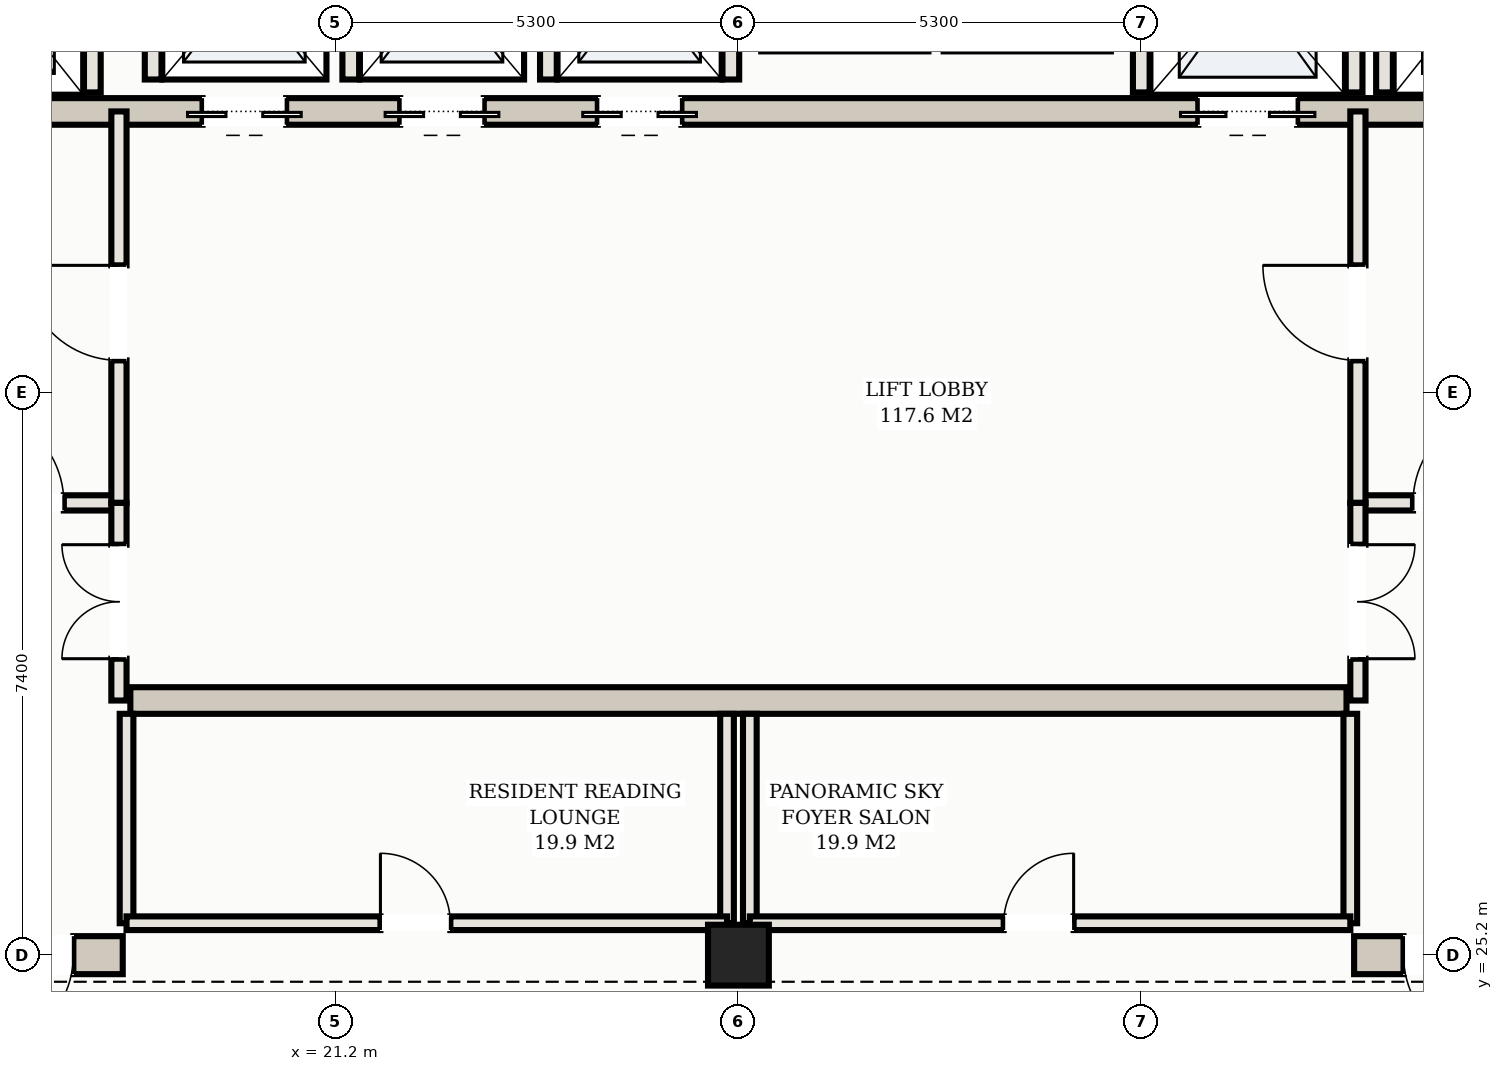
"""IFC4 building model, lengths in metres.
Left out: names, types, materials, properties, quantities, classifications, styles, units other than length and angle.
Written with IfcOpenShell. Run it as: python <this file> out.ifc"""

import sys

from ifc_helpers import new_model, si_unit, direction, frame, frame_2d, origin, origin_2d, place, context, subcontext, project, spatial, rectangle, hollow_rectangle, extrude, element, fill, save


model = new_model("IFC4")
c1 = context("Model", 3, precision=1e-05, world=origin(), true_north=direction((0.0, 1.0)))
c2 = subcontext(c1, "Body", "Model", "MODEL_VIEW")
j1 = project(units=[si_unit("LENGTHUNIT", "METRE"), si_unit("PLANEANGLEUNIT", "RADIAN")], contexts=[c1])
p1 = place(None, origin())
s1 = spatial("IfcSite", under=j1, at=p1, CompositionType="ELEMENT")
p2 = place(p1, origin())
s2 = spatial("IfcBuilding", under=s1, at=p2, CompositionType="ELEMENT")
p3 = place(p2, frame((0.0, 0.0, 203.3)))
s3 = spatial("IfcBuildingStorey", under=s2, at=p3, CompositionType="ELEMENT", Elevation=203.3)
p4 = place(p3, frame((10.35, 25.2, 0.0), z_axis=(0.0, 0.0, 1.0), x_axis=(1.0, 0.0, 0.0)))
e1 = element("IfcWall", 1, at=p4, inside=s3, PredefinedType="SHEAR", context=c2, shape_type="SweptSolid", body=[
    extrude(rectangle(XDim=8.05, YDim=0.5, at=frame_2d((4.025, 0.0))), origin(), (0.0, 0.0, 1.0), 3.11),
])
p5 = place(p4, frame((6.15, 0.0, 0.0)))
e2 = element("IfcOpeningElement", 2, at=p5, cuts=e1, PredefinedType="OPENING", context=c2, shape_type="SweptSolid", body=[
    extrude(rectangle(XDim=1.25, YDim=2.2, at=frame_2d((0.625, 1.1))), frame((0.0, 0.26, 0.0), z_axis=(0.0, -1.0, 0.0), x_axis=(1.0, 0.0, 0.0)), (0.0, 0.0, 1.0), 0.52),
])
p6 = place(p3, frame((34.6, 25.2, 0.0), z_axis=(0.0, 0.0, 1.0), x_axis=(1.0, 0.0, 0.0)))
e3 = element("IfcWall", 3, at=p6, inside=s3, PredefinedType="SHEAR", context=c2, shape_type="SweptSolid", body=[
    extrude(rectangle(XDim=8.05, YDim=0.5, at=frame_2d((4.025, 0.0))), origin(), (0.0, 0.0, 1.0), 3.11),
])
p7 = place(p6, frame((0.65, 0.0, 0.0)))
e4 = element("IfcOpeningElement", 4, at=p7, cuts=e3, PredefinedType="OPENING", context=c2, shape_type="SweptSolid", body=[
    extrude(rectangle(XDim=1.25, YDim=2.2, at=frame_2d((0.625, 1.1))), frame((0.0, 0.26, 0.0), z_axis=(0.0, -1.0, 0.0), x_axis=(1.0, 0.0, 0.0)), (0.0, 0.0, 1.0), 0.52),
])
p8 = place(p3, frame((15.5, 36.3, 0.0), z_axis=(0.0, 0.0, 1.0), x_axis=(1.0, 0.0, 0.0)))
e5 = element("IfcWall", 5, at=p8, inside=s3, PredefinedType="SHEAR", context=c2, shape_type="SweptSolid", body=[
    extrude(rectangle(XDim=22.0, YDim=0.35, at=frame_2d((11.0, 0.0))), origin(), (0.0, 0.0, 1.0), 3.11),
])
p9 = place(p8, frame((0.65, 0.0, 0.0)))
e6 = element("IfcOpeningElement", 6, at=p9, cuts=e5, PredefinedType="OPENING", context=c2, shape_type="SweptSolid", body=[
    extrude(rectangle(XDim=1.1, YDim=2.15, at=frame_2d((0.55, 1.075))), frame((0.0, 0.185, 0.0), z_axis=(0.0, -1.0, 0.0), x_axis=(1.0, 0.0, 0.0)), (0.0, 0.0, 1.0), 0.37),
])
p10 = place(p8, frame((20.25, 0.0, 0.0)))
e7 = element("IfcOpeningElement", 7, at=p10, cuts=e5, PredefinedType="OPENING", context=c2, shape_type="SweptSolid", body=[
    extrude(rectangle(XDim=1.1, YDim=2.15, at=frame_2d((0.55, 1.075))), frame((0.0, 0.185, 0.0), z_axis=(0.0, -1.0, 0.0), x_axis=(1.0, 0.0, 0.0)), (0.0, 0.0, 1.0), 0.37),
])
p11 = place(p8, frame((17.05, 0.0, 0.0)))
e8 = element("IfcOpeningElement", 8, at=p11, cuts=e5, PredefinedType="OPENING", context=c2, shape_type="SweptSolid", body=[
    extrude(rectangle(XDim=1.3, YDim=2.2, at=frame_2d((0.65, 1.1))), frame((0.0, 0.185, 0.0), z_axis=(0.0, -1.0, 0.0), x_axis=(1.0, 0.0, 0.0)), (0.0, 0.0, 1.0), 0.37),
])
p12 = place(p8, frame((3.95, 0.0, 0.0)))
e9 = element("IfcOpeningElement", 9, at=p12, cuts=e5, PredefinedType="OPENING", context=c2, shape_type="SweptSolid", body=[
    extrude(rectangle(XDim=1.1, YDim=2.15, at=frame_2d((0.55, 1.075))), frame((0.0, 0.185, 0.0), z_axis=(0.0, -1.0, 0.0), x_axis=(1.0, 0.0, 0.0)), (0.0, 0.0, 1.0), 0.37),
])
p13 = place(p8, frame((6.55, 0.0, 0.0)))
e10 = element("IfcOpeningElement", 10, at=p13, cuts=e5, PredefinedType="OPENING", context=c2, shape_type="SweptSolid", body=[
    extrude(rectangle(XDim=1.1, YDim=2.15, at=frame_2d((0.55, 1.075))), frame((0.0, 0.185, 0.0), z_axis=(0.0, -1.0, 0.0), x_axis=(1.0, 0.0, 0.0)), (0.0, 0.0, 1.0), 0.37),
])
p14 = place(p8, frame((9.15, 0.0, 0.0)))
e11 = element("IfcOpeningElement", 11, at=p14, cuts=e5, PredefinedType="OPENING", context=c2, shape_type="SweptSolid", body=[
    extrude(rectangle(XDim=1.1, YDim=2.15, at=frame_2d((0.55, 1.075))), frame((0.0, 0.185, 0.0), z_axis=(0.0, -1.0, 0.0), x_axis=(1.0, 0.0, 0.0)), (0.0, 0.0, 1.0), 0.37),
])
p15 = place(p3, frame((18.5, 28.55, 0.0), z_axis=(0.0, 0.0, 1.0), x_axis=(1.0, 0.0, 0.0)))
e12 = element("IfcWall", 12, at=p15, inside=s3, PredefinedType="SHEAR", context=c2, shape_type="SweptSolid", body=[
    extrude(rectangle(XDim=16.0, YDim=0.35, at=frame_2d((8.0, 0.0))), origin(), (0.0, 0.0, 1.0), 3.11),
])
p16 = place(p3, frame((26.5, 25.2, 0.0), z_axis=(0.0, 0.0, 1.0), x_axis=(1.0, 0.0, 0.0)))
e13 = element("IfcColumn", 13, at=p16, inside=s3, PredefinedType="COLUMN", context=c2, shape_type="SweptSolid", body=[
    extrude(hollow_rectangle(XDim=0.8, YDim=0.8, WallThickness=0.028, at=origin_2d()), origin(), (0.0, 0.0, 1.0), 3.3),
])
for number, where, z_axis, x_axis in (
    (14, (18.0, 36.55, 0.0), (0.0, 0.0, 1.0), (0.0, 1.0, 0.0)),
    (15, (35.0, 36.55, 0.0), (0.0, 0.0, 1.0), (0.0, 1.0, 0.0)),
    (16, (31.8, 36.55, 0.0), (0.0, 0.0, 1.0), (0.0, 1.0, 0.0)),
    (17, (34.6, 36.55, 0.0), (0.0, 0.0, 1.0), (0.0, 1.0, 0.0)),
):
    element("IfcWall", number, at=place(p3, frame(where, z_axis=z_axis, x_axis=x_axis)), inside=s3, PredefinedType="SOLIDWALL", context=c2, shape_type="SweptSolid", body=[
        extrude(rectangle(XDim=2.93, YDim=0.22, at=frame_2d((1.465, 0.0))), origin(), (0.0, 0.0, 1.0), 3.11),
    ])
for number, where, z_axis, x_axis in (
    (18, (18.8, 36.72, 0.0), (0.0, 0.0, 1.0), (0.0, 1.0, 0.0)),
    (19, (21.4, 36.72, 0.0), (0.0, 0.0, 1.0), (0.0, 1.0, 0.0)),
    (20, (24.0, 36.72, 0.0), (0.0, 0.0, 1.0), (0.0, 1.0, 0.0)),
    (21, (26.4, 36.72, 0.0), (0.0, 0.0, 1.0), (0.0, 1.0, 0.0)),
):
    element("IfcWall", number, at=place(p3, frame(where, z_axis=z_axis, x_axis=x_axis)), inside=s3, PredefinedType="SOLIDWALL", context=c2, shape_type="SweptSolid", body=[
        extrude(rectangle(XDim=2.56, YDim=0.22, at=frame_2d((1.28, 0.0))), origin(), (0.0, 0.0, 1.0), 3.11),
    ])
p17 = place(p3, frame((15.1, 31.15, 0.0), z_axis=(0.0, 0.0, 1.0), x_axis=(1.0, 0.0, 0.0)))
e22 = element("IfcWall", 22, at=p17, inside=s3, PredefinedType="PARTITIONING", context=c2, shape_type="SweptSolid", body=[
    extrude(rectangle(XDim=3.25, YDim=0.2, at=frame_2d((1.625, 0.0))), origin(), (0.0, 0.0, 1.0), 2.43),
])
p18 = place(p17, frame((1.275, 0.0, 0.0)))
e23 = element("IfcOpeningElement", 23, at=p18, cuts=e22, PredefinedType="OPENING", context=c2, shape_type="SweptSolid", body=[
    extrude(rectangle(XDim=1.25, YDim=2.2, at=frame_2d((0.625, 1.1))), frame((0.0, 0.11, 0.0), z_axis=(0.0, -1.0, 0.0), x_axis=(1.0, 0.0, 0.0)), (0.0, 0.0, 1.0), 0.22),
])
p19 = place(p3, frame((18.35, 31.15, 0.0), z_axis=(0.0, 0.0, 1.0), x_axis=(0.0, 1.0, 0.0)))
e24 = element("IfcWall", 24, at=p19, inside=s3, PredefinedType="PARTITIONING", context=c2, shape_type="SweptSolid", body=[
    extrude(rectangle(XDim=5.15, YDim=0.2, at=frame_2d((2.575, 0.0))), origin(), (0.0, 0.0, 1.0), 2.43),
])
p20 = place(p19, frame((1.875, 0.0, 0.0)))
e25 = element("IfcOpeningElement", 25, at=p20, cuts=e24, PredefinedType="OPENING", context=c2, shape_type="SweptSolid", body=[
    extrude(rectangle(XDim=1.25, YDim=2.2, at=frame_2d((0.625, 1.1))), frame((0.0, 0.11, 0.0), z_axis=(0.0, -1.0, 0.0), x_axis=(1.0, 0.0, 0.0)), (0.0, 0.0, 1.0), 0.22),
])
p21 = place(p3, frame((34.65, 31.15, 0.0), z_axis=(0.0, 0.0, 1.0), x_axis=(1.0, 0.0, 0.0)))
e26 = element("IfcWall", 26, at=p21, inside=s3, PredefinedType="PARTITIONING", context=c2, shape_type="SweptSolid", body=[
    extrude(rectangle(XDim=3.25, YDim=0.2, at=frame_2d((1.625, 0.0))), origin(), (0.0, 0.0, 1.0), 2.43),
])
p22 = place(p21, frame((0.725, 0.0, 0.0)))
e27 = element("IfcOpeningElement", 27, at=p22, cuts=e26, PredefinedType="OPENING", context=c2, shape_type="SweptSolid", body=[
    extrude(rectangle(XDim=1.25, YDim=2.2, at=frame_2d((0.625, 1.1))), frame((0.0, 0.11, 0.0), z_axis=(0.0, -1.0, 0.0), x_axis=(1.0, 0.0, 0.0)), (0.0, 0.0, 1.0), 0.22),
])
p23 = place(p3, frame((34.65, 31.15, 0.0), z_axis=(0.0, 0.0, 1.0), x_axis=(0.0, 1.0, 0.0)))
e28 = element("IfcWall", 28, at=p23, inside=s3, PredefinedType="PARTITIONING", context=c2, shape_type="SweptSolid", body=[
    extrude(rectangle(XDim=5.15, YDim=0.2, at=frame_2d((2.575, 0.0))), origin(), (0.0, 0.0, 1.0), 2.43),
])
p24 = place(p23, frame((1.875, 0.0, 0.0)))
e29 = element("IfcOpeningElement", 29, at=p24, cuts=e28, PredefinedType="OPENING", context=c2, shape_type="SweptSolid", body=[
    extrude(rectangle(XDim=1.25, YDim=2.2, at=frame_2d((0.625, 1.1))), frame((0.0, 0.11, 0.0), z_axis=(0.0, -1.0, 0.0), x_axis=(1.0, 0.0, 0.0)), (0.0, 0.0, 1.0), 0.22),
])
p25 = place(p3, frame((18.35, 28.55, 0.0), z_axis=(0.0, 0.0, 1.0), x_axis=(0.0, 1.0, 0.0)))
e30 = element("IfcWall", 30, at=p25, inside=s3, PredefinedType="PARTITIONING", context=c2, shape_type="SweptSolid", body=[
    extrude(rectangle(XDim=2.6, YDim=0.2, at=frame_2d((1.3, 0.0))), origin(), (0.0, 0.0, 1.0), 2.43),
])
p26 = place(p25, frame((0.55, 0.0, 0.0)))
e31 = element("IfcOpeningElement", 31, at=p26, cuts=e30, PredefinedType="OPENING", context=c2, shape_type="SweptSolid", body=[
    extrude(rectangle(XDim=1.5, YDim=2.25, at=frame_2d((0.75, 1.125))), frame((0.0, 0.11, 0.0), z_axis=(0.0, -1.0, 0.0), x_axis=(1.0, 0.0, 0.0)), (0.0, 0.0, 1.0), 0.22),
])
p27 = place(p3, frame((34.65, 28.55, 0.0), z_axis=(0.0, 0.0, 1.0), x_axis=(0.0, 1.0, 0.0)))
e32 = element("IfcWall", 32, at=p27, inside=s3, PredefinedType="PARTITIONING", context=c2, shape_type="SweptSolid", body=[
    extrude(rectangle(XDim=2.6, YDim=0.2, at=frame_2d((1.3, 0.0))), origin(), (0.0, 0.0, 1.0), 2.43),
])
p28 = place(p27, frame((0.55, 0.0, 0.0)))
e33 = element("IfcOpeningElement", 33, at=p28, cuts=e32, PredefinedType="OPENING", context=c2, shape_type="SweptSolid", body=[
    extrude(rectangle(XDim=1.5, YDim=2.25, at=frame_2d((0.75, 1.125))), frame((0.0, 0.11, 0.0), z_axis=(0.0, -1.0, 0.0), x_axis=(1.0, 0.0, 0.0)), (0.0, 0.0, 1.0), 0.22),
])
for number, where, z_axis, x_axis in (
    (34, (18.45, 25.62, 0.0), (0.0, 0.0, 1.0), (0.0, 1.0, 0.0)),
    (35, (26.35, 25.62, 0.0), (0.0, 0.0, 1.0), (0.0, 1.0, 0.0)),
):
    element("IfcWall", number, at=place(p3, frame(where, z_axis=z_axis, x_axis=x_axis)), inside=s3, PredefinedType="PARTITIONING", context=c2, shape_type="SweptSolid", body=[
        extrude(rectangle(XDim=2.755, YDim=0.18, at=frame_2d((1.377, 0.0))), origin(), (0.0, 0.0, 1.0), 2.43),
    ])
p29 = place(p3, frame((18.45, 25.62, 0.0), z_axis=(0.0, 0.0, 1.0), x_axis=(1.0, 0.0, 0.0)))
e36 = element("IfcWall", 36, at=p29, inside=s3, PredefinedType="PARTITIONING", context=c2, shape_type="SweptSolid", body=[
    extrude(rectangle(XDim=7.9, YDim=0.18, at=frame_2d((3.95, 0.0))), origin(), (0.0, 0.0, 1.0), 2.43),
])
p30 = place(p29, frame((3.34, 0.0, 0.0)))
e37 = element("IfcOpeningElement", 37, at=p30, cuts=e36, PredefinedType="OPENING", context=c2, shape_type="SweptSolid", body=[
    extrude(rectangle(XDim=0.92, YDim=2.15, at=frame_2d((0.46, 1.075))), frame((0.0, 0.1, 0.0), z_axis=(0.0, -1.0, 0.0), x_axis=(1.0, 0.0, 0.0)), (0.0, 0.0, 1.0), 0.2),
])
for number, where, z_axis, x_axis in (
    (38, (26.65, 25.62, 0.0), (0.0, 0.0, 1.0), (0.0, 1.0, 0.0)),
    (39, (34.55, 25.62, 0.0), (0.0, 0.0, 1.0), (0.0, 1.0, 0.0)),
):
    element("IfcWall", number, at=place(p3, frame(where, z_axis=z_axis, x_axis=x_axis)), inside=s3, PredefinedType="PARTITIONING", context=c2, shape_type="SweptSolid", body=[
        extrude(rectangle(XDim=2.755, YDim=0.18, at=frame_2d((1.377, 0.0))), origin(), (0.0, 0.0, 1.0), 2.43),
    ])
p31 = place(p3, frame((26.65, 25.62, 0.0), z_axis=(0.0, 0.0, 1.0), x_axis=(1.0, 0.0, 0.0)))
e40 = element("IfcWall", 40, at=p31, inside=s3, PredefinedType="PARTITIONING", context=c2, shape_type="SweptSolid", body=[
    extrude(rectangle(XDim=7.9, YDim=0.18, at=frame_2d((3.95, 0.0))), origin(), (0.0, 0.0, 1.0), 2.43),
])
p32 = place(p31, frame((3.34, 0.0, 0.0)))
e41 = element("IfcOpeningElement", 41, at=p32, cuts=e40, PredefinedType="OPENING", context=c2, shape_type="SweptSolid", body=[
    extrude(rectangle(XDim=0.92, YDim=2.15, at=frame_2d((0.46, 1.075))), frame((0.0, 0.1, 0.0), z_axis=(0.0, -1.0, 0.0), x_axis=(1.0, 0.0, 0.0)), (0.0, 0.0, 1.0), 0.2),
])
p33 = place(p11, frame((1.3, 0.0, 0.0), z_axis=(0.0, 0.0, 1.0), x_axis=(-1.0, 0.0, 0.0)))
e42 = element("IfcDoor", 42, at=p33, inside=s3, OperationType="DOUBLE_DOOR_SLIDING", PredefinedType="DOOR", context=c2, shape_type="SweptSolid", body=[
    extrude(rectangle(XDim=1.3, YDim=2.2, at=frame_2d((0.65, 1.1))), frame((0.0, 0.025, 0.0), z_axis=(0.0, -1.0, 0.0), x_axis=(1.0, 0.0, 0.0)), (0.0, 0.0, 1.0), 0.05),
])
fill(e8, e42)
p34 = place(p12, frame((1.1, 0.0, 0.0), z_axis=(0.0, 0.0, 1.0), x_axis=(-1.0, 0.0, 0.0)))
e43 = element("IfcDoor", 43, at=p34, inside=s3, OperationType="DOUBLE_DOOR_SLIDING", PredefinedType="DOOR", context=c2, shape_type="SweptSolid", body=[
    extrude(rectangle(XDim=1.1, YDim=2.15, at=frame_2d((0.55, 1.075))), frame((0.0, 0.025, 0.0), z_axis=(0.0, -1.0, 0.0), x_axis=(1.0, 0.0, 0.0)), (0.0, 0.0, 1.0), 0.05),
])
fill(e9, e43)
p35 = place(p13, frame((1.1, 0.0, 0.0), z_axis=(0.0, 0.0, 1.0), x_axis=(-1.0, 0.0, 0.0)))
e44 = element("IfcDoor", 44, at=p35, inside=s3, OperationType="DOUBLE_DOOR_SLIDING", PredefinedType="DOOR", context=c2, shape_type="SweptSolid", body=[
    extrude(rectangle(XDim=1.1, YDim=2.15, at=frame_2d((0.55, 1.075))), frame((0.0, 0.025, 0.0), z_axis=(0.0, -1.0, 0.0), x_axis=(1.0, 0.0, 0.0)), (0.0, 0.0, 1.0), 0.05),
])
fill(e10, e44)
p36 = place(p14, frame((1.1, 0.0, 0.0), z_axis=(0.0, 0.0, 1.0), x_axis=(-1.0, 0.0, 0.0)))
e45 = element("IfcDoor", 45, at=p36, inside=s3, OperationType="DOUBLE_DOOR_SLIDING", PredefinedType="DOOR", context=c2, shape_type="SweptSolid", body=[
    extrude(rectangle(XDim=1.1, YDim=2.15, at=frame_2d((0.55, 1.075))), frame((0.0, 0.025, 0.0), z_axis=(0.0, -1.0, 0.0), x_axis=(1.0, 0.0, 0.0)), (0.0, 0.0, 1.0), 0.05),
])
fill(e11, e45)
p37 = place(p5, frame((1.25, 0.0, 0.0), z_axis=(0.0, 0.0, 1.0), x_axis=(-1.0, 0.0, 0.0)))
e46 = element("IfcDoor", 46, at=p37, inside=s3, OperationType="SINGLE_SWING_RIGHT", PredefinedType="DOOR", context=c2, shape_type="SweptSolid", body=[
    extrude(rectangle(XDim=1.25, YDim=2.2, at=frame_2d((0.625, 1.1))), frame((0.0, 0.025, 0.0), z_axis=(0.0, -1.0, 0.0), x_axis=(1.0, 0.0, 0.0)), (0.0, 0.0, 1.0), 0.05),
])
fill(e2, e46)
p38 = place(p7, frame((1.25, 0.0, 0.0), z_axis=(0.0, 0.0, 1.0), x_axis=(-1.0, 0.0, 0.0)))
e47 = element("IfcDoor", 47, at=p38, inside=s3, OperationType="SINGLE_SWING_LEFT", PredefinedType="DOOR", context=c2, shape_type="SweptSolid", body=[
    extrude(rectangle(XDim=1.25, YDim=2.2, at=frame_2d((0.625, 1.1))), frame((0.0, 0.025, 0.0), z_axis=(0.0, -1.0, 0.0), x_axis=(1.0, 0.0, 0.0)), (0.0, 0.0, 1.0), 0.05),
])
fill(e4, e47)
p39 = place(p18, origin())
e48 = element("IfcDoor", 48, at=p39, inside=s3, OperationType="SINGLE_SWING_LEFT", PredefinedType="DOOR", context=c2, shape_type="SweptSolid", body=[
    extrude(rectangle(XDim=1.25, YDim=2.2, at=frame_2d((0.625, 1.1))), frame((0.0, 0.025, 0.0), z_axis=(0.0, -1.0, 0.0), x_axis=(1.0, 0.0, 0.0)), (0.0, 0.0, 1.0), 0.05),
])
fill(e23, e48)
p40 = place(p20, origin())
e49 = element("IfcDoor", 49, at=p40, inside=s3, OperationType="SINGLE_SWING_RIGHT", PredefinedType="DOOR", context=c2, shape_type="SweptSolid", body=[
    extrude(rectangle(XDim=1.25, YDim=2.2, at=frame_2d((0.625, 1.1))), frame((0.0, 0.025, 0.0), z_axis=(0.0, -1.0, 0.0), x_axis=(1.0, 0.0, 0.0)), (0.0, 0.0, 1.0), 0.05),
])
fill(e25, e49)
p41 = place(p22, origin())
e50 = element("IfcDoor", 50, at=p41, inside=s3, OperationType="SINGLE_SWING_RIGHT", PredefinedType="DOOR", context=c2, shape_type="SweptSolid", body=[
    extrude(rectangle(XDim=1.25, YDim=2.2, at=frame_2d((0.625, 1.1))), frame((0.0, 0.025, 0.0), z_axis=(0.0, -1.0, 0.0), x_axis=(1.0, 0.0, 0.0)), (0.0, 0.0, 1.0), 0.05),
])
fill(e27, e50)
p42 = place(p24, origin())
e51 = element("IfcDoor", 51, at=p42, inside=s3, OperationType="SINGLE_SWING_RIGHT", PredefinedType="DOOR", context=c2, shape_type="SweptSolid", body=[
    extrude(rectangle(XDim=1.25, YDim=2.2, at=frame_2d((0.625, 1.1))), frame((0.0, 0.025, 0.0), z_axis=(0.0, -1.0, 0.0), x_axis=(1.0, 0.0, 0.0)), (0.0, 0.0, 1.0), 0.05),
])
fill(e29, e51)
p43 = place(p26, origin())
e52 = element("IfcDoor", 52, at=p43, inside=s3, OperationType="DOUBLE_DOOR_SINGLE_SWING", PredefinedType="DOOR", context=c2, shape_type="SweptSolid", body=[
    extrude(rectangle(XDim=1.5, YDim=2.25, at=frame_2d((0.75, 1.125))), frame((0.0, 0.025, 0.0), z_axis=(0.0, -1.0, 0.0), x_axis=(1.0, 0.0, 0.0)), (0.0, 0.0, 1.0), 0.05),
])
fill(e31, e52)
p44 = place(p28, frame((1.5, 0.0, 0.0), z_axis=(0.0, 0.0, 1.0), x_axis=(-1.0, 0.0, 0.0)))
e53 = element("IfcDoor", 53, at=p44, inside=s3, OperationType="DOUBLE_DOOR_SINGLE_SWING", PredefinedType="DOOR", context=c2, shape_type="SweptSolid", body=[
    extrude(rectangle(XDim=1.5, YDim=2.25, at=frame_2d((0.75, 1.125))), frame((0.0, 0.025, 0.0), z_axis=(0.0, -1.0, 0.0), x_axis=(1.0, 0.0, 0.0)), (0.0, 0.0, 1.0), 0.05),
])
fill(e33, e53)
p45 = place(p30, origin())
e54 = element("IfcDoor", 54, at=p45, inside=s3, OperationType="SINGLE_SWING_LEFT", PredefinedType="DOOR", context=c2, shape_type="SweptSolid", body=[
    extrude(rectangle(XDim=0.92, YDim=2.15, at=frame_2d((0.46, 1.075))), frame((0.0, 0.025, 0.0), z_axis=(0.0, -1.0, 0.0), x_axis=(1.0, 0.0, 0.0)), (0.0, 0.0, 1.0), 0.05),
])
fill(e37, e54)
p46 = place(p32, origin())
e55 = element("IfcDoor", 55, at=p46, inside=s3, OperationType="SINGLE_SWING_RIGHT", PredefinedType="DOOR", context=c2, shape_type="SweptSolid", body=[
    extrude(rectangle(XDim=0.92, YDim=2.15, at=frame_2d((0.46, 1.075))), frame((0.0, 0.025, 0.0), z_axis=(0.0, -1.0, 0.0), x_axis=(1.0, 0.0, 0.0)), (0.0, 0.0, 1.0), 0.05),
])
fill(e41, e55)
save(model, sys.argv[1])
